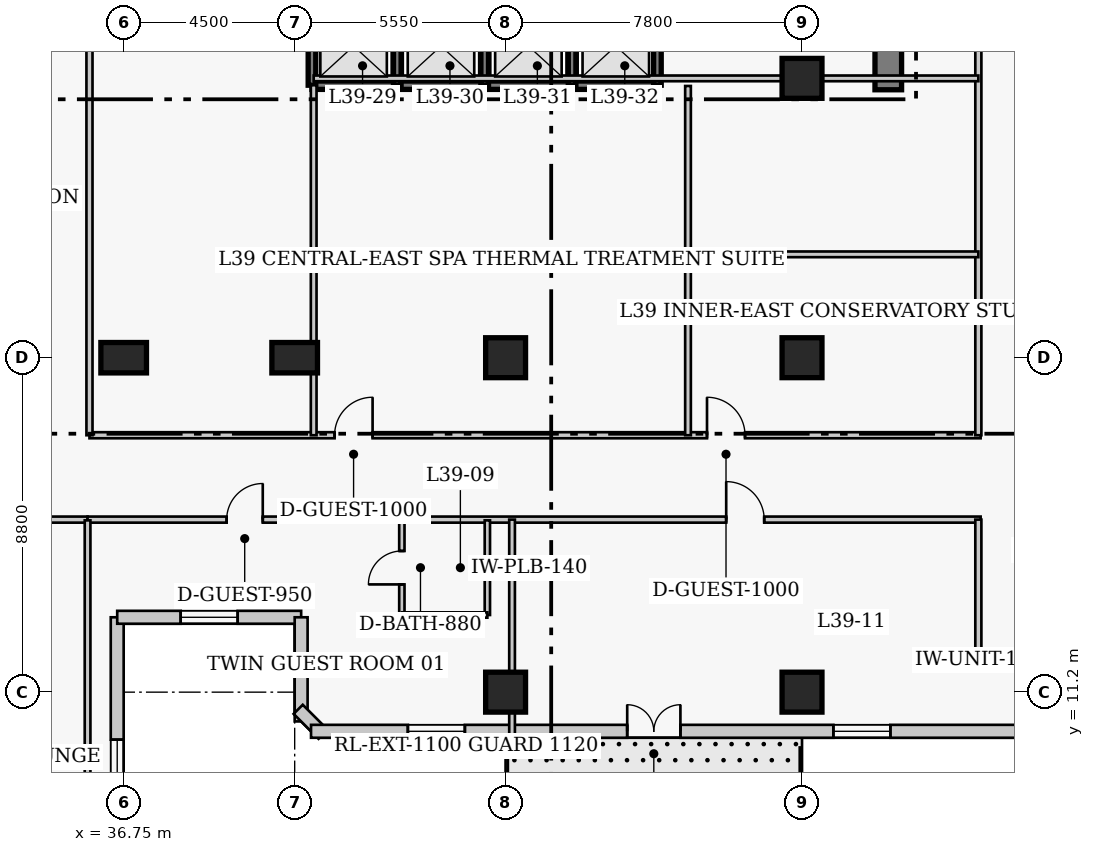
"""IFC4 building model, lengths in metres.
Left out: names, types, materials, properties, quantities, classifications, styles, units other than length and angle.
Written with IfcOpenShell. Run it as: python <this file> out.ifc"""

import sys

from ifc_helpers import new_model, si_unit, direction, frame, frame_2d, origin, origin_2d, place, context, subcontext, project, spatial, rectangle, extrude, element, fill, save


model = new_model("IFC4")
c1 = context("Model", 3, precision=1e-05, world=origin(), true_north=direction((0.0, 1.0)))
c2 = subcontext(c1, "Body", "Model", "MODEL_VIEW")
j1 = project(units=[si_unit("LENGTHUNIT", "METRE"), si_unit("PLANEANGLEUNIT", "RADIAN")], contexts=[c1])
p1 = place(None, origin())
s1 = spatial("IfcSite", under=j1, at=p1, CompositionType="ELEMENT")
p2 = place(p1, origin())
s2 = spatial("IfcBuilding", under=s1, at=p2, CompositionType="ELEMENT")
p3 = place(p2, frame((0.0, 0.0, 157.4)))
s3 = spatial("IfcBuildingStorey", under=s2, at=p3, CompositionType="ELEMENT", Elevation=157.4)
p4 = place(p3, frame((56.87, 27.05, 0.0), z_axis=(0.0, 0.0, 1.0), x_axis=(0.0, 1.0, 0.0)))
e1 = element("IfcWall", 1, at=p4, inside=s3, PredefinedType="SHEAR", context=c2, shape_type="SweptSolid", body=[
    extrude(rectangle(XDim=13.62, YDim=0.7, at=frame_2d((6.81, 0.0))), origin(), (0.0, 0.0, 1.0), 3.8),
])
for number, where, z_axis, x_axis in (
    (2, (36.75, 20.0, 0.0), (0.0, 0.0, 1.0), (1.0, 0.0, 0.0)),
    (3, (41.25, 20.0, 0.0), (0.0, 0.0, 1.0), (1.0, 0.0, 0.0)),
):
    element("IfcColumn", number, at=place(p3, frame(where, z_axis=z_axis, x_axis=x_axis)), inside=s3, PredefinedType="COLUMN", context=c2, shape_type="SweptSolid", body=[
        extrude(rectangle(XDim=1.2, YDim=0.8, at=origin_2d()), origin(), (0.0, 0.0, 1.0), 3.8),
    ])
for number, where, z_axis, x_axis in (
    (4, (46.8, 11.2, 0.0), (0.0, 0.0, 1.0), (1.0, 0.0, 0.0)),
    (5, (46.8, 20.0, 0.0), (0.0, 0.0, 1.0), (1.0, 0.0, 0.0)),
    (6, (54.6, 11.2, 0.0), (0.0, 0.0, 1.0), (1.0, 0.0, 0.0)),
    (7, (54.6, 20.0, 0.0), (0.0, 0.0, 1.0), (1.0, 0.0, 0.0)),
    (8, (54.6, 27.35, 0.0), (0.0, 0.0, 1.0), (1.0, 0.0, 0.0)),
):
    element("IfcColumn", number, at=place(p3, frame(where, z_axis=z_axis, x_axis=x_axis)), inside=s3, PredefinedType="COLUMN", context=c2, shape_type="SweptSolid", body=[
        extrude(rectangle(XDim=1.05, YDim=1.05, at=origin_2d()), origin(), (0.0, 0.0, 1.0), 3.8),
    ])
p5 = place(p3, frame((36.58, 5.23, 0.0), z_axis=(0.0, 0.0, 1.0), x_axis=(0.0, 1.0, 0.0)))
e9 = element("IfcWall", 9, at=p5, inside=s3, PredefinedType="SOLIDWALL", context=c2, shape_type="SweptSolid", body=[
    extrude(rectangle(XDim=7.94, YDim=0.34, at=frame_2d((3.97, 0.0))), origin(), (0.0, 0.0, 1.0), 3.55),
])
p6 = place(p5, frame((3.22, 0.0, 0.85)))
e10 = element("IfcOpeningElement", 10, at=p6, cuts=e9, PredefinedType="OPENING", context=c2, shape_type="SweptSolid", body=[
    extrude(rectangle(XDim=1.5, YDim=1.75, at=frame_2d((0.75, 0.875))), frame((0.0, 0.18, 0.0), z_axis=(0.0, -1.0, 0.0), x_axis=(1.0, 0.0, 0.0)), (0.0, 0.0, 1.0), 0.36),
])
p7 = place(p3, frame((36.58, 13.17, 0.0), z_axis=(0.0, 0.0, 1.0), x_axis=(1.0, 0.0, 0.0)))
e11 = element("IfcWall", 11, at=p7, inside=s3, PredefinedType="SOLIDWALL", context=c2, shape_type="SweptSolid", body=[
    extrude(rectangle(XDim=4.84, YDim=0.34, at=frame_2d((2.42, 0.0))), origin(), (0.0, 0.0, 1.0), 3.55),
])
p8 = place(p7, frame((1.67, 0.0, 0.85)))
e12 = element("IfcOpeningElement", 12, at=p8, cuts=e11, PredefinedType="OPENING", context=c2, shape_type="SweptSolid", body=[
    extrude(rectangle(XDim=1.5, YDim=1.75, at=frame_2d((0.75, 0.875))), frame((0.0, 0.18, 0.0), z_axis=(0.0, -1.0, 0.0), x_axis=(1.0, 0.0, 0.0)), (0.0, 0.0, 1.0), 0.36),
])
p9 = place(p3, frame((41.42, 13.17, 0.0), z_axis=(0.0, 0.0, 1.0), x_axis=(0.0, -1.0, 0.0)))
e13 = element("IfcWall", 13, at=p9, inside=s3, PredefinedType="SOLIDWALL", context=c2, shape_type="SweptSolid", body=[
    extrude(rectangle(XDim=2.74, YDim=0.34, at=frame_2d((1.37, 0.0))), origin(), (0.0, 0.0, 1.0), 3.55),
])
p10 = place(p3, frame((41.342, 10.749, 0.0), z_axis=(0.0, 0.0, 1.0), x_axis=(0.707106781187, -0.707106781187, 0.0)))
e14 = element("IfcWall", 14, at=p10, inside=s3, PredefinedType="SOLIDWALL", context=c2, shape_type="SweptSolid", body=[
    extrude(rectangle(XDim=0.929, YDim=0.34, at=frame_2d((0.464, 0.0))), origin(), (0.0, 0.0, 1.0), 3.55),
])
p11 = place(p3, frame((41.68, 10.17, 0.0), z_axis=(0.0, 0.0, 1.0), x_axis=(1.0, 0.0, 0.0)))
e15 = element("IfcWall", 15, at=p11, inside=s3, PredefinedType="SOLIDWALL", context=c2, shape_type="SweptSolid", body=[
    extrude(rectangle(XDim=26.69, YDim=0.34, at=frame_2d((13.345, 0.0))), origin(), (0.0, 0.0, 1.0), 3.55),
])
p12 = place(p11, frame((8.32, 0.0, 0.0)))
e16 = element("IfcOpeningElement", 16, at=p12, cuts=e15, PredefinedType="OPENING", context=c2, shape_type="SweptSolid", body=[
    extrude(rectangle(XDim=1.4, YDim=2.15, at=frame_2d((0.7, 1.075))), frame((0.0, 0.18, 0.0), z_axis=(0.0, -1.0, 0.0), x_axis=(1.0, 0.0, 0.0)), (0.0, 0.0, 1.0), 0.36),
])
p13 = place(p11, frame((2.548, 0.0, 0.85)))
e17 = element("IfcOpeningElement", 17, at=p13, cuts=e15, PredefinedType="OPENING", context=c2, shape_type="SweptSolid", body=[
    extrude(rectangle(XDim=1.5, YDim=1.75, at=frame_2d((0.75, 0.875))), frame((0.0, 0.18, 0.0), z_axis=(0.0, -1.0, 0.0), x_axis=(1.0, 0.0, 0.0)), (0.0, 0.0, 1.0), 0.36),
])
p14 = place(p11, frame((13.745, 0.0, 0.85)))
e18 = element("IfcOpeningElement", 18, at=p14, cuts=e15, PredefinedType="OPENING", context=c2, shape_type="SweptSolid", body=[
    extrude(rectangle(XDim=1.5, YDim=1.75, at=frame_2d((0.75, 0.875))), frame((0.0, 0.18, 0.0), z_axis=(0.0, -1.0, 0.0), x_axis=(1.0, 0.0, 0.0)), (0.0, 0.0, 1.0), 0.36),
])
p15 = place(p11, frame((21.492, 0.0, 0.85)))
e19 = element("IfcOpeningElement", 19, at=p15, cuts=e15, PredefinedType="OPENING", context=c2, shape_type="SweptSolid", body=[
    extrude(rectangle(XDim=1.5, YDim=1.75, at=frame_2d((0.75, 0.875))), frame((0.0, 0.18, 0.0), z_axis=(0.0, -1.0, 0.0), x_axis=(1.0, 0.0, 0.0)), (0.0, 0.0, 1.0), 0.36),
])
p16 = place(p3, frame((41.705, 27.17, 0.0), z_axis=(0.0, 0.0, 1.0), x_axis=(1.0, 0.0, 0.0)))
e20 = element("IfcWall", 20, at=p16, inside=s3, PredefinedType="SHEAR", context=c2, shape_type="SweptSolid", body=[
    extrude(rectangle(XDim=2.245, YDim=0.22, at=frame_2d((1.123, 0.0))), origin(), (0.0, 0.0, 1.0), 3.8),
])
p17 = place(p3, frame((41.705, 27.17, 0.0), z_axis=(0.0, 0.0, 1.0), x_axis=(0.0, 1.0, 0.0)))
e21 = element("IfcWall", 21, at=p17, inside=s3, PredefinedType="SHEAR", context=c2, shape_type="SweptSolid", body=[
    extrude(rectangle(XDim=2.06, YDim=0.2, at=frame_2d((1.03, 0.0))), origin(), (0.0, 0.0, 1.0), 3.8),
])
p18 = place(p3, frame((43.95, 27.17, 0.0), z_axis=(0.0, 0.0, 1.0), x_axis=(1.0, 0.0, 0.0)))
e22 = element("IfcWall", 22, at=p18, inside=s3, PredefinedType="SHEAR", context=c2, shape_type="SweptSolid", body=[
    extrude(rectangle(XDim=2.3, YDim=0.22, at=frame_2d((1.15, 0.0))), origin(), (0.0, 0.0, 1.0), 3.8),
])
p19 = place(p3, frame((43.95, 27.17, 0.0), z_axis=(0.0, 0.0, 1.0), x_axis=(0.0, 1.0, 0.0)))
e23 = element("IfcWall", 23, at=p19, inside=s3, PredefinedType="SHEAR", context=c2, shape_type="SweptSolid", body=[
    extrude(rectangle(XDim=2.06, YDim=0.2, at=frame_2d((1.03, 0.0))), origin(), (0.0, 0.0, 1.0), 3.8),
])
p20 = place(p3, frame((46.25, 27.17, 0.0), z_axis=(0.0, 0.0, 1.0), x_axis=(1.0, 0.0, 0.0)))
e24 = element("IfcWall", 24, at=p20, inside=s3, PredefinedType="SHEAR", context=c2, shape_type="SweptSolid", body=[
    extrude(rectangle(XDim=2.3, YDim=0.22, at=frame_2d((1.15, 0.0))), origin(), (0.0, 0.0, 1.0), 3.8),
])
p21 = place(p3, frame((46.25, 27.17, 0.0), z_axis=(0.0, 0.0, 1.0), x_axis=(0.0, 1.0, 0.0)))
e25 = element("IfcWall", 25, at=p21, inside=s3, PredefinedType="SHEAR", context=c2, shape_type="SweptSolid", body=[
    extrude(rectangle(XDim=2.06, YDim=0.2, at=frame_2d((1.03, 0.0))), origin(), (0.0, 0.0, 1.0), 3.8),
])
p22 = place(p3, frame((48.55, 27.17, 0.0), z_axis=(0.0, 0.0, 1.0), x_axis=(1.0, 0.0, 0.0)))
e26 = element("IfcWall", 26, at=p22, inside=s3, PredefinedType="SHEAR", context=c2, shape_type="SweptSolid", body=[
    extrude(rectangle(XDim=2.245, YDim=0.22, at=frame_2d((1.123, 0.0))), origin(), (0.0, 0.0, 1.0), 3.8),
])
for number, where, z_axis, x_axis in (
    (27, (48.55, 27.17, 0.0), (0.0, 0.0, 1.0), (0.0, 1.0, 0.0)),
    (28, (50.795, 27.17, 0.0), (0.0, 0.0, 1.0), (0.0, 1.0, 0.0)),
):
    element("IfcWall", number, at=place(p3, frame(where, z_axis=z_axis, x_axis=x_axis)), inside=s3, PredefinedType="SHEAR", context=c2, shape_type="SweptSolid", body=[
        extrude(rectangle(XDim=2.06, YDim=0.2, at=frame_2d((1.03, 0.0))), origin(), (0.0, 0.0, 1.0), 3.8),
    ])
p23 = place(p3, frame((35.85, 17.96, 0.0), z_axis=(0.0, 0.0, 1.0), x_axis=(1.0, 0.0, 0.0)))
e29 = element("IfcWall", 29, at=p23, inside=s3, PredefinedType="PARTITIONING", context=c2, shape_type="SweptSolid", body=[
    extrude(rectangle(XDim=23.45, YDim=0.16, at=frame_2d((11.725, 0.0))), origin(), (0.0, 0.0, 1.0), 3.55),
])
p24 = place(p23, frame((6.45, 0.0, 0.0)))
e30 = element("IfcOpeningElement", 30, at=p24, cuts=e29, PredefinedType="OPENING", context=c2, shape_type="SweptSolid", body=[
    extrude(rectangle(XDim=1.0, YDim=2.15, at=frame_2d((0.5, 1.075))), frame((0.0, 0.09, 0.0), z_axis=(0.0, -1.0, 0.0), x_axis=(1.0, 0.0, 0.0)), (0.0, 0.0, 1.0), 0.18),
])
p25 = place(p23, frame((16.25, 0.0, 0.0)))
e31 = element("IfcOpeningElement", 31, at=p25, cuts=e29, PredefinedType="OPENING", context=c2, shape_type="SweptSolid", body=[
    extrude(rectangle(XDim=1.0, YDim=2.15, at=frame_2d((0.5, 1.075))), frame((0.0, 0.09, 0.0), z_axis=(0.0, -1.0, 0.0), x_axis=(1.0, 0.0, 0.0)), (0.0, 0.0, 1.0), 0.18),
])
p26 = place(p3, frame((35.85, 17.96, 0.0), z_axis=(0.0, 0.0, 1.0), x_axis=(0.0, 1.0, 0.0)))
e32 = element("IfcWall", 32, at=p26, inside=s3, PredefinedType="PARTITIONING", context=c2, shape_type="SweptSolid", body=[
    extrude(rectangle(XDim=11.59, YDim=0.16, at=frame_2d((5.795, 0.0))), origin(), (0.0, 0.0, 1.0), 3.55),
])
p27 = place(p3, frame((18.8, 15.74, 0.0), z_axis=(0.0, 0.0, 1.0), x_axis=(1.0, 0.0, 0.0)))
e33 = element("IfcWall", 33, at=p27, inside=s3, PredefinedType="PARTITIONING", context=c2, shape_type="SweptSolid", body=[
    extrude(rectangle(XDim=17.0, YDim=0.16, at=frame_2d((8.5, 0.0))), origin(), (0.0, 0.0, 1.0), 3.55),
])
p28 = place(p27, frame((8.03, 0.0, 0.0)))
e34 = element("IfcOpeningElement", 34, at=p28, cuts=e33, PredefinedType="OPENING", context=c2, shape_type="SweptSolid", body=[
    extrude(rectangle(XDim=1.0, YDim=2.15, at=frame_2d((0.5, 1.075))), frame((0.0, 0.09, 0.0), z_axis=(0.0, -1.0, 0.0), x_axis=(1.0, 0.0, 0.0)), (0.0, 0.0, 1.0), 0.18),
])
p29 = place(p3, frame((35.8, 15.74, 0.0), z_axis=(0.0, 0.0, 1.0), x_axis=(1.0, 0.0, 0.0)))
e35 = element("IfcWall", 35, at=p29, inside=s3, PredefinedType="PARTITIONING", context=c2, shape_type="SweptSolid", body=[
    extrude(rectangle(XDim=23.5, YDim=0.16, at=frame_2d((11.75, 0.0))), origin(), (0.0, 0.0, 1.0), 3.55),
])
p30 = place(p29, frame((3.66, 0.0, 0.0)))
e36 = element("IfcOpeningElement", 36, at=p30, cuts=e35, PredefinedType="OPENING", context=c2, shape_type="SweptSolid", body=[
    extrude(rectangle(XDim=0.95, YDim=2.1, at=frame_2d((0.475, 1.05))), frame((0.0, 0.09, 0.0), z_axis=(0.0, -1.0, 0.0), x_axis=(1.0, 0.0, 0.0)), (0.0, 0.0, 1.0), 0.18),
])
p31 = place(p29, frame((16.805, 0.0, 0.0)))
e37 = element("IfcOpeningElement", 37, at=p31, cuts=e35, PredefinedType="OPENING", context=c2, shape_type="SweptSolid", body=[
    extrude(rectangle(XDim=1.0, YDim=2.15, at=frame_2d((0.5, 1.075))), frame((0.0, 0.09, 0.0), z_axis=(0.0, -1.0, 0.0), x_axis=(1.0, 0.0, 0.0)), (0.0, 0.0, 1.0), 0.18),
])
p32 = place(p3, frame((59.24, 17.96, 0.0), z_axis=(0.0, 0.0, 1.0), x_axis=(0.0, 1.0, 0.0)))
e38 = element("IfcWall", 38, at=p32, inside=s3, PredefinedType="PARTITIONING", context=c2, shape_type="SweptSolid", body=[
    extrude(rectangle(XDim=22.69, YDim=0.16, at=frame_2d((11.345, 0.0))), origin(), (0.0, 0.0, 1.0), 3.55),
])
p33 = place(p3, frame((59.24, 12.05, 0.0), z_axis=(0.0, 0.0, 1.0), x_axis=(0.0, 1.0, 0.0)))
e39 = element("IfcWall", 39, at=p33, inside=s3, PredefinedType="PARTITIONING", context=c2, shape_type="SweptSolid", body=[
    extrude(rectangle(XDim=3.69, YDim=0.16, at=frame_2d((1.845, 0.0))), origin(), (0.0, 0.0, 1.0), 3.55),
])
p34 = place(p3, frame((59.24, 12.05, 0.0), z_axis=(0.0, 0.0, 1.0), x_axis=(1.0, 0.0, 0.0)))
e40 = element("IfcWall", 40, at=p34, inside=s3, PredefinedType="PARTITIONING", context=c2, shape_type="SweptSolid", body=[
    extrude(rectangle(XDim=2.22, YDim=0.15, at=frame_2d((1.11, 0.0))), origin(), (0.0, 0.0, 1.0), 3.55),
])
p35 = place(p3, frame((41.75, 17.96, 0.0), z_axis=(0.0, 0.0, 1.0), x_axis=(0.0, 1.0, 0.0)))
e41 = element("IfcWall", 41, at=p35, inside=s3, PredefinedType="PARTITIONING", context=c2, shape_type="SweptSolid", body=[
    extrude(rectangle(XDim=9.21, YDim=0.15, at=frame_2d((4.605, 0.0))), origin(), (0.0, 0.0, 1.0), 3.55),
])
p36 = place(p3, frame((51.6, 17.96, 0.0), z_axis=(0.0, 0.0, 1.0), x_axis=(0.0, 1.0, 0.0)))
e42 = element("IfcWall", 42, at=p36, inside=s3, PredefinedType="PARTITIONING", context=c2, shape_type="SweptSolid", body=[
    extrude(rectangle(XDim=9.19, YDim=0.15, at=frame_2d((4.595, 0.0))), origin(), (0.0, 0.0, 1.0), 3.55),
])
p37 = place(p3, frame((41.75, 27.35, 0.0), z_axis=(0.0, 0.0, 1.0), x_axis=(1.0, 0.0, 0.0)))
e43 = element("IfcWall", 43, at=p37, inside=s3, PredefinedType="PARTITIONING", context=c2, shape_type="SweptSolid", body=[
    extrude(rectangle(XDim=17.49, YDim=0.15, at=frame_2d((8.745, 0.0))), origin(), (0.0, 0.0, 1.0), 3.55),
])
p38 = place(p3, frame((51.6, 22.72, 0.0), z_axis=(0.0, 0.0, 1.0), x_axis=(1.0, 0.0, 0.0)))
e44 = element("IfcWall", 44, at=p38, inside=s3, PredefinedType="PARTITIONING", context=c2, shape_type="SweptSolid", body=[
    extrude(rectangle(XDim=7.64, YDim=0.15, at=frame_2d((3.82, 0.0))), origin(), (0.0, 0.0, 1.0), 3.55),
])
p39 = place(p3, frame((35.8, 4.82, 0.0), z_axis=(0.0, 0.0, 1.0), x_axis=(0.0, 1.0, 0.0)))
e45 = element("IfcWall", 45, at=p39, inside=s3, PredefinedType="PARTITIONING", context=c2, shape_type="SweptSolid", body=[
    extrude(rectangle(XDim=10.9, YDim=0.15, at=frame_2d((5.45, 0.0))), origin(), (0.0, 0.0, 1.0), 3.55),
])
p40 = place(p3, frame((44.07, 13.23, 0.0), z_axis=(0.0, 0.0, 1.0), x_axis=(0.0, 1.0, 0.0)))
e46 = element("IfcWall", 46, at=p40, inside=s3, PredefinedType="PLUMBINGWALL", context=c2, shape_type="SweptSolid", body=[
    extrude(rectangle(XDim=2.49, YDim=0.14, at=frame_2d((1.245, 0.0))), origin(), (0.0, 0.0, 1.0), 3.55),
])
p41 = place(p40, frame((0.805, 0.0, 0.0)))
e47 = element("IfcOpeningElement", 47, at=p41, cuts=e46, PredefinedType="OPENING", context=c2, shape_type="SweptSolid", body=[
    extrude(rectangle(XDim=0.88, YDim=2.05, at=frame_2d((0.44, 1.025))), frame((0.0, 0.08, 0.0), z_axis=(0.0, -1.0, 0.0), x_axis=(1.0, 0.0, 0.0)), (0.0, 0.0, 1.0), 0.16),
])
p42 = place(p3, frame((46.32, 13.23, 0.0), z_axis=(0.0, 0.0, 1.0), x_axis=(0.0, 1.0, 0.0)))
e48 = element("IfcWall", 48, at=p42, inside=s3, PredefinedType="PLUMBINGWALL", context=c2, shape_type="SweptSolid", body=[
    extrude(rectangle(XDim=2.49, YDim=0.14, at=frame_2d((1.245, 0.0))), origin(), (0.0, 0.0, 1.0), 3.55),
])
p43 = place(p3, frame((44.07, 13.23, 0.0), z_axis=(0.0, 0.0, 1.0), x_axis=(1.0, 0.0, 0.0)))
e49 = element("IfcWall", 49, at=p43, inside=s3, PredefinedType="PLUMBINGWALL", context=c2, shape_type="SweptSolid", body=[
    extrude(rectangle(XDim=2.25, YDim=0.14, at=frame_2d((1.125, 0.0))), origin(), (0.0, 0.0, 1.0), 3.55),
])
p44 = place(p3, frame((46.97, 10.02, 0.0), z_axis=(0.0, 0.0, 1.0), x_axis=(0.0, 1.0, 0.0)))
e50 = element("IfcWall", 50, at=p44, inside=s3, PredefinedType="PARTITIONING", context=c2, shape_type="SweptSolid", body=[
    extrude(rectangle(XDim=5.72, YDim=0.15, at=frame_2d((2.86, 0.0))), origin(), (0.0, 0.0, 1.0), 2.9),
])
p45 = place(p6, origin())
e51 = element("IfcWindow", 51, at=p45, inside=s3, PartitioningType="SINGLE_PANEL", PredefinedType="WINDOW", context=c2, shape_type="SweptSolid", body=[
    extrude(rectangle(XDim=1.5, YDim=1.75, at=frame_2d((0.75, 0.875))), frame((0.0, 0.03, 0.0), z_axis=(0.0, -1.0, 0.0), x_axis=(1.0, 0.0, 0.0)), (0.0, 0.0, 1.0), 0.06),
])
fill(e10, e51)
p46 = place(p8, origin())
e52 = element("IfcWindow", 52, at=p46, inside=s3, PartitioningType="SINGLE_PANEL", PredefinedType="WINDOW", context=c2, shape_type="SweptSolid", body=[
    extrude(rectangle(XDim=1.5, YDim=1.75, at=frame_2d((0.75, 0.875))), frame((0.0, 0.03, 0.0), z_axis=(0.0, -1.0, 0.0), x_axis=(1.0, 0.0, 0.0)), (0.0, 0.0, 1.0), 0.06),
])
fill(e12, e52)
p47 = place(p12, origin())
e53 = element("IfcDoor", 53, at=p47, inside=s3, OperationType="DOUBLE_DOOR_SINGLE_SWING", PredefinedType="DOOR", context=c2, shape_type="SweptSolid", body=[
    extrude(rectangle(XDim=1.4, YDim=2.15, at=frame_2d((0.7, 1.075))), frame((0.0, 0.025, 0.0), z_axis=(0.0, -1.0, 0.0), x_axis=(1.0, 0.0, 0.0)), (0.0, 0.0, 1.0), 0.05),
])
fill(e16, e53)
p48 = place(p13, origin())
e54 = element("IfcWindow", 54, at=p48, inside=s3, PartitioningType="SINGLE_PANEL", PredefinedType="WINDOW", context=c2, shape_type="SweptSolid", body=[
    extrude(rectangle(XDim=1.5, YDim=1.75, at=frame_2d((0.75, 0.875))), frame((0.0, 0.03, 0.0), z_axis=(0.0, -1.0, 0.0), x_axis=(1.0, 0.0, 0.0)), (0.0, 0.0, 1.0), 0.06),
])
fill(e17, e54)
p49 = place(p14, origin())
e55 = element("IfcWindow", 55, at=p49, inside=s3, PartitioningType="SINGLE_PANEL", PredefinedType="WINDOW", context=c2, shape_type="SweptSolid", body=[
    extrude(rectangle(XDim=1.5, YDim=1.75, at=frame_2d((0.75, 0.875))), frame((0.0, 0.03, 0.0), z_axis=(0.0, -1.0, 0.0), x_axis=(1.0, 0.0, 0.0)), (0.0, 0.0, 1.0), 0.06),
])
fill(e18, e55)
p50 = place(p24, origin())
e56 = element("IfcDoor", 56, at=p50, inside=s3, OperationType="SINGLE_SWING_RIGHT", PredefinedType="DOOR", context=c2, shape_type="SweptSolid", body=[
    extrude(rectangle(XDim=1.0, YDim=2.15, at=frame_2d((0.5, 1.075))), frame((0.0, 0.025, 0.0), z_axis=(0.0, -1.0, 0.0), x_axis=(1.0, 0.0, 0.0)), (0.0, 0.0, 1.0), 0.05),
])
fill(e30, e56)
p51 = place(p25, origin())
e57 = element("IfcDoor", 57, at=p51, inside=s3, OperationType="SINGLE_SWING_LEFT", PredefinedType="DOOR", context=c2, shape_type="SweptSolid", body=[
    extrude(rectangle(XDim=1.0, YDim=2.15, at=frame_2d((0.5, 1.075))), frame((0.0, 0.025, 0.0), z_axis=(0.0, -1.0, 0.0), x_axis=(1.0, 0.0, 0.0)), (0.0, 0.0, 1.0), 0.05),
])
fill(e31, e57)
p52 = place(p41, origin())
e58 = element("IfcDoor", 58, at=p52, inside=s3, OperationType="SINGLE_SWING_LEFT", PredefinedType="DOOR", context=c2, shape_type="SweptSolid", body=[
    extrude(rectangle(XDim=0.88, YDim=2.05, at=frame_2d((0.44, 1.025))), frame((0.0, 0.025, 0.0), z_axis=(0.0, -1.0, 0.0), x_axis=(1.0, 0.0, 0.0)), (0.0, 0.0, 1.0), 0.05),
])
fill(e47, e58)
p53 = place(p30, origin())
e59 = element("IfcDoor", 59, at=p53, inside=s3, OperationType="SINGLE_SWING_RIGHT", PredefinedType="DOOR", context=c2, shape_type="SweptSolid", body=[
    extrude(rectangle(XDim=0.95, YDim=2.1, at=frame_2d((0.475, 1.05))), frame((0.0, 0.025, 0.0), z_axis=(0.0, -1.0, 0.0), x_axis=(1.0, 0.0, 0.0)), (0.0, 0.0, 1.0), 0.05),
])
fill(e36, e59)
p54 = place(p31, origin())
e60 = element("IfcDoor", 60, at=p54, inside=s3, OperationType="SINGLE_SWING_LEFT", PredefinedType="DOOR", context=c2, shape_type="SweptSolid", body=[
    extrude(rectangle(XDim=1.0, YDim=2.15, at=frame_2d((0.5, 1.075))), frame((0.0, 0.025, 0.0), z_axis=(0.0, -1.0, 0.0), x_axis=(1.0, 0.0, 0.0)), (0.0, 0.0, 1.0), 0.05),
])
fill(e37, e60)
save(model, sys.argv[1])
